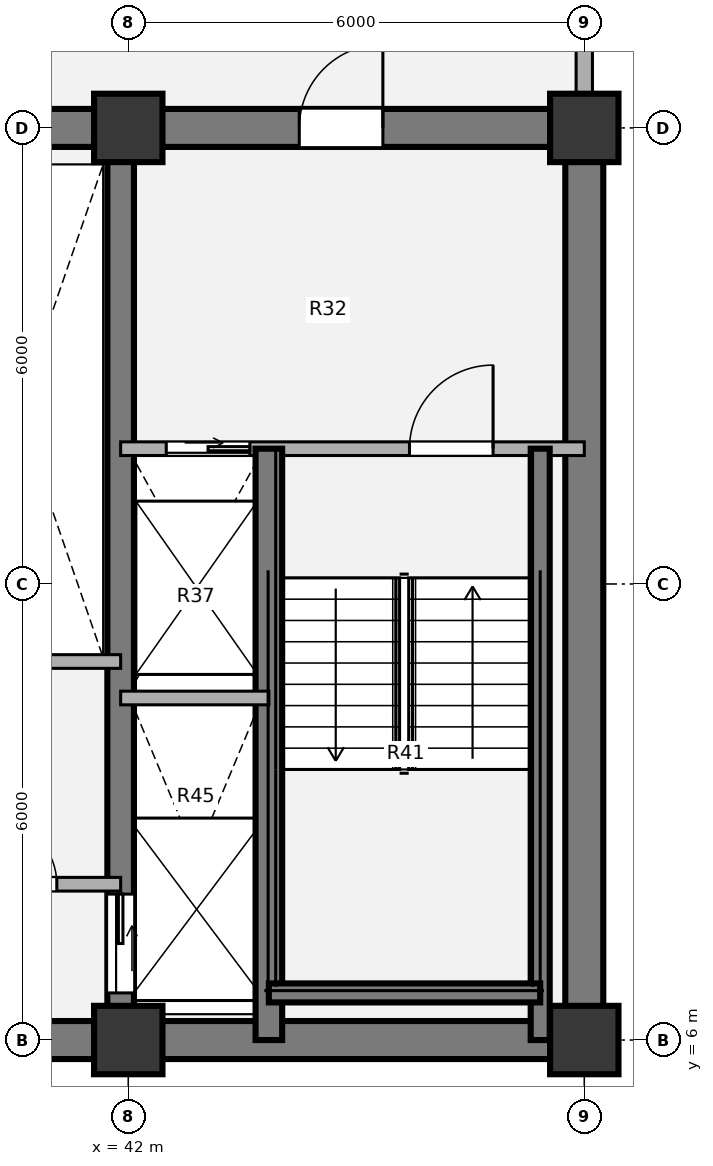
"""IFC4 building model, lengths in metres.
Left out: names, types, materials, properties, quantities, classifications, styles, units other than length and angle.
Written with IfcOpenShell. Run it as: python <this file> out.ifc"""

import sys

from ifc_helpers import new_model, si_unit, direction, frame, frame_2d, origin, origin_2d, place, context, subcontext, project, spatial, rectangle, extrude, source, transform, mapped, element, fill, save


model = new_model("IFC4")
c1 = context("Model", 3, precision=1e-05, world=origin(), true_north=direction((0.0, 1.0)))
c2 = subcontext(c1, "Body", "Model", "MODEL_VIEW")
j1 = project(units=[si_unit("LENGTHUNIT", "METRE"), si_unit("PLANEANGLEUNIT", "RADIAN")], contexts=[c1])
p1 = place(None, origin())
s1 = spatial("IfcSite", under=j1, at=p1, CompositionType="ELEMENT")
p2 = place(p1, origin())
s2 = spatial("IfcBuilding", under=s1, at=p2, CompositionType="ELEMENT")
p3 = place(p2, frame((0.0, 0.0, 135.18)))
s3 = spatial("IfcBuildingStorey", under=s2, at=p3, CompositionType="ELEMENT", Elevation=135.18)
m1 = source(origin(), c2, "Body", "SweptSolid", [
    extrude(rectangle(XDim=0.9, YDim=0.9, at=origin_2d()), origin(), (0.0, 0.0, 1.0), 3.78),
])
for number, where, z_axis, x_axis in (
    (1, (42.0, 6.0, 0.0), (0.0, 0.0, 1.0), (1.0, 0.0, 0.0)),
    (2, (48.0, 6.0, 0.0), (0.0, 0.0, 1.0), (1.0, 0.0, 0.0)),
    (3, (42.0, 18.0, 0.0), (0.0, 0.0, 1.0), (1.0, 0.0, 0.0)),
    (4, (48.0, 18.0, 0.0), (0.0, 0.0, 1.0), (1.0, 0.0, 0.0)),
):
    element("IfcColumn", number, at=place(p3, frame(where, z_axis=z_axis, x_axis=x_axis)), inside=s3, PredefinedType="COLUMN", context=c2, shape_type="MappedRepresentation", body=[
        mapped(m1, transform((0.0, 0.0, 0.0), x_axis=(1.0, 0.0, 0.0), y_axis=(0.0, 1.0, 0.0), z_axis=(0.0, 0.0, 1.0), scale=1.0)),
    ])
p4 = place(p3, frame((48.25, 6.0, 0.0), z_axis=(0.0, 0.0, 1.0), x_axis=(-1.0, 0.0, 0.0)))
e5 = element("IfcWall", 5, at=p4, inside=s3, PredefinedType="SHEAR", context=c2, shape_type="SweptSolid", body=[
    extrude(rectangle(XDim=24.5, YDim=0.5, at=frame_2d((12.25, 0.0))), origin(), (0.0, 0.0, 1.0), 3.78),
])
p5 = place(p3, frame((48.0, 18.0, 0.0), z_axis=(0.0, 0.0, 1.0), x_axis=(0.0, -1.0, 0.0)))
e6 = element("IfcWall", 6, at=p5, inside=s3, PredefinedType="SHEAR", context=c2, shape_type="SweptSolid", body=[
    extrude(rectangle(XDim=12.0, YDim=0.5, at=frame_2d((6.0, 0.0))), origin(), (0.0, 0.0, 1.0), 3.78),
])
p6 = place(p3, frame((38.8, 18.0, 0.0), z_axis=(0.0, 0.0, 1.0), x_axis=(1.0, 0.0, 0.0)))
e7 = element("IfcWall", 7, at=p6, inside=s3, PredefinedType="SHEAR", context=c2, shape_type="SweptSolid", body=[
    extrude(rectangle(XDim=9.45, YDim=0.5, at=frame_2d((4.725, 0.0))), origin(), (0.0, 0.0, 1.0), 3.78),
])
p7 = place(p6, frame((5.45, 0.0, 0.0)))
e8 = element("IfcOpeningElement", 8, at=p7, cuts=e7, PredefinedType="OPENING", context=c2, shape_type="SweptSolid", body=[
    extrude(rectangle(XDim=1.1, YDim=2.1, at=origin_2d()), frame((0.55, 0.26, 1.05), z_axis=(0.0, -1.0, 0.0), x_axis=(1.0, 0.0, 0.0)), (0.0, 0.0, 1.0), 0.52),
])
p8 = place(p3, frame((41.9, 18.0, 0.0), z_axis=(0.0, 0.0, 1.0), x_axis=(0.0, -1.0, 0.0)))
e9 = element("IfcWall", 9, at=p8, inside=s3, PredefinedType="SHEAR", context=c2, shape_type="SweptSolid", body=[
    extrude(rectangle(XDim=12.0, YDim=0.35, at=frame_2d((6.0, 0.0))), origin(), (0.0, 0.0, 1.0), 3.78),
])
p9 = place(p8, frame((10.08, 0.0, 0.0)))
e10 = element("IfcOpeningElement", 10, at=p9, cuts=e9, PredefinedType="OPENING", context=c2, shape_type="SweptSolid", body=[
    extrude(rectangle(XDim=1.3, YDim=2.1, at=origin_2d()), frame((0.65, 0.185, 1.05), z_axis=(0.0, -1.0, 0.0), x_axis=(1.0, 0.0, 0.0)), (0.0, 0.0, 1.0), 0.37),
])
p10 = place(p3, frame((48.0, 21.05, 0.0), z_axis=(0.0, 0.0, 1.0), x_axis=(0.0, -1.0, 0.0)))
e11 = element("IfcWall", 11, at=p10, inside=s3, PredefinedType="SOLIDWALL", context=c2, shape_type="SweptSolid", body=[
    extrude(rectangle(XDim=2.62, YDim=0.215, at=frame_2d((1.31, 0.0))), origin(), (0.0, 0.0, 1.0), 3.53),
])
p11 = place(p3, frame((39.35, 10.98, 0.0), z_axis=(0.0, 0.0, 1.0), x_axis=(1.0, 0.0, 0.0)))
e12 = element("IfcWall", 12, at=p11, inside=s3, PredefinedType="PARTITIONING", context=c2, shape_type="SweptSolid", body=[
    extrude(rectangle(XDim=2.55, YDim=0.18, at=frame_2d((1.275, 0.0))), origin(), (0.0, 0.0, 1.0), 3.5),
])
p12 = place(p3, frame((39.35, 8.05, 0.0), z_axis=(0.0, 0.0, 1.0), x_axis=(1.0, 0.0, 0.0)))
e13 = element("IfcWall", 13, at=p12, inside=s3, PredefinedType="PARTITIONING", context=c2, shape_type="SweptSolid", body=[
    extrude(rectangle(XDim=2.55, YDim=0.18, at=frame_2d((1.275, 0.0))), origin(), (0.0, 0.0, 1.0), 3.5),
])
p13 = place(p12, frame((0.85, 0.0, 0.0)))
e14 = element("IfcOpeningElement", 14, at=p13, cuts=e13, PredefinedType="OPENING", context=c2, shape_type="SweptSolid", body=[
    extrude(rectangle(XDim=0.86, YDim=2.1, at=origin_2d()), frame((0.43, 0.1, 1.05), z_axis=(0.0, -1.0, 0.0), x_axis=(1.0, 0.0, 0.0)), (0.0, 0.0, 1.0), 0.2),
])
p14 = place(p3, frame((41.9, 13.78, 0.0), z_axis=(0.0, 0.0, 1.0), x_axis=(1.0, 0.0, 0.0)))
e15 = element("IfcWall", 15, at=p14, inside=s3, PredefinedType="PARTITIONING", context=c2, shape_type="SweptSolid", body=[
    extrude(rectangle(XDim=6.1, YDim=0.18, at=frame_2d((3.05, 0.0))), origin(), (0.0, 0.0, 1.0), 3.5),
])
p15 = place(p14, frame((0.6, 0.0, 0.0)))
e16 = element("IfcOpeningElement", 16, at=p15, cuts=e15, PredefinedType="OPENING", context=c2, shape_type="SweptSolid", body=[
    extrude(rectangle(XDim=1.1, YDim=2.1, at=origin_2d()), frame((0.55, 0.1, 1.05), z_axis=(0.0, -1.0, 0.0), x_axis=(1.0, 0.0, 0.0)), (0.0, 0.0, 1.0), 0.2),
])
p16 = place(p14, frame((3.8, 0.0, 0.0)))
e17 = element("IfcOpeningElement", 17, at=p16, cuts=e15, PredefinedType="OPENING", context=c2, shape_type="SweptSolid", body=[
    extrude(rectangle(XDim=1.1, YDim=2.1, at=origin_2d()), frame((0.55, 0.1, 1.05), z_axis=(0.0, -1.0, 0.0), x_axis=(1.0, 0.0, 0.0)), (0.0, 0.0, 1.0), 0.2),
])
p17 = place(p3, frame((43.85, 6.0, 0.0), z_axis=(0.0, 0.0, 1.0), x_axis=(0.0, 1.0, 0.0)))
e18 = element("IfcWall", 18, at=p17, inside=s3, PredefinedType="SHEAR", context=c2, shape_type="SweptSolid", body=[
    extrude(rectangle(XDim=7.78, YDim=0.35, at=frame_2d((3.89, 0.0))), origin(), (0.0, 0.0, 1.0), 3.85),
])
p18 = place(p3, frame((47.42, 6.0, 0.0), z_axis=(0.0, 0.0, 1.0), x_axis=(0.0, 1.0, 0.0)))
e19 = element("IfcWall", 19, at=p18, inside=s3, PredefinedType="SHEAR", context=c2, shape_type="SweptSolid", body=[
    extrude(rectangle(XDim=7.78, YDim=0.25, at=frame_2d((3.89, 0.0))), origin(), (0.0, 0.0, 1.0), 3.85),
])
p19 = place(p3, frame((43.85, 6.62, 0.0), z_axis=(0.0, 0.0, 1.0), x_axis=(1.0, 0.0, 0.0)))
e20 = element("IfcWall", 20, at=p19, inside=s3, PredefinedType="SHEAR", context=c2, shape_type="SweptSolid", body=[
    extrude(rectangle(XDim=3.57, YDim=0.25, at=frame_2d((1.785, 0.0))), origin(), (0.0, 0.0, 1.0), 3.85),
])
p20 = place(p3, frame((41.9, 10.5, 0.0), z_axis=(0.0, 0.0, 1.0), x_axis=(1.0, 0.0, 0.0)))
e21 = element("IfcWall", 21, at=p20, inside=s3, PredefinedType="PARTITIONING", context=c2, shape_type="SweptSolid", body=[
    extrude(rectangle(XDim=1.95, YDim=0.18, at=frame_2d((0.975, 0.0))), origin(), (0.0, 0.0, 1.0), 3.5),
])
m2 = source(origin(), c2, "Body", "SweptSolid", [
    extrude(rectangle(XDim=0.86, YDim=2.1, at=origin_2d()), frame((0.43, 0.025, 1.05), z_axis=(0.0, -1.0, 0.0), x_axis=(1.0, 0.0, 0.0)), (0.0, 0.0, 1.0), 0.05),
])
p21 = place(p13, origin())
e22 = element("IfcDoor", 22, at=p21, inside=s3, OperationType="SINGLE_SWING_LEFT", PredefinedType="DOOR", context=c2, shape_type="MappedRepresentation", body=[
    mapped(m2, transform((0.0, 0.0, 0.0), x_axis=(1.0, 0.0, 0.0), y_axis=(0.0, 1.0, 0.0), z_axis=(0.0, 0.0, 1.0), scale=1.0)),
])
fill(e14, e22)
m3 = source(origin(), c2, "Body", "SweptSolid", [
    extrude(rectangle(XDim=1.1, YDim=2.1, at=origin_2d()), frame((0.55, 0.025, 1.05), z_axis=(0.0, -1.0, 0.0), x_axis=(1.0, 0.0, 0.0)), (0.0, 0.0, 1.0), 0.05),
])
p22 = place(p15, origin())
e23 = element("IfcDoor", 23, at=p22, inside=s3, OperationType="SLIDING_TO_RIGHT", PredefinedType="DOOR", context=c2, shape_type="MappedRepresentation", body=[
    mapped(m3, transform((0.0, 0.0, 0.0), x_axis=(1.0, 0.0, 0.0), y_axis=(0.0, 1.0, 0.0), z_axis=(0.0, 0.0, 1.0), scale=1.0)),
])
fill(e16, e23)
m4 = source(origin(), c2, "Body", "SweptSolid", [
    extrude(rectangle(XDim=1.1, YDim=2.1, at=origin_2d()), frame((0.55, 0.025, 1.05), z_axis=(0.0, -1.0, 0.0), x_axis=(1.0, 0.0, 0.0)), (0.0, 0.0, 1.0), 0.05),
])
p23 = place(p16, origin())
e24 = element("IfcDoor", 24, at=p23, inside=s3, OperationType="SINGLE_SWING_RIGHT", PredefinedType="DOOR", context=c2, shape_type="MappedRepresentation", body=[
    mapped(m4, transform((0.0, 0.0, 0.0), x_axis=(1.0, 0.0, 0.0), y_axis=(0.0, 1.0, 0.0), z_axis=(0.0, 0.0, 1.0), scale=1.0)),
])
fill(e17, e24)
m5 = source(origin(), c2, "Body", "SweptSolid", [
    extrude(rectangle(XDim=1.3, YDim=2.1, at=origin_2d()), frame((0.65, 0.025, 1.05), z_axis=(0.0, -1.0, 0.0), x_axis=(1.0, 0.0, 0.0)), (0.0, 0.0, 1.0), 0.05),
])
p24 = place(p9, origin())
e25 = element("IfcDoor", 25, at=p24, inside=s3, OperationType="SLIDING_TO_LEFT", PredefinedType="DOOR", context=c2, shape_type="MappedRepresentation", body=[
    mapped(m5, transform((0.0, 0.0, 0.0), x_axis=(1.0, 0.0, 0.0), y_axis=(0.0, 1.0, 0.0), z_axis=(0.0, 0.0, 1.0), scale=1.0)),
])
fill(e10, e25)
m6 = source(origin(), c2, "Body", "SweptSolid", [
    extrude(rectangle(XDim=1.1, YDim=2.1, at=origin_2d()), frame((0.55, 0.025, 1.05), z_axis=(0.0, -1.0, 0.0), x_axis=(1.0, 0.0, 0.0)), (0.0, 0.0, 1.0), 0.05),
])
p25 = place(p7, origin())
e26 = element("IfcDoor", 26, at=p25, inside=s3, OperationType="SINGLE_SWING_RIGHT", PredefinedType="DOOR", context=c2, shape_type="MappedRepresentation", body=[
    mapped(m6, transform((0.0, 0.0, 0.0), x_axis=(1.0, 0.0, 0.0), y_axis=(0.0, 1.0, 0.0), z_axis=(0.0, 0.0, 1.0), scale=1.0)),
])
fill(e8, e26)
save(model, sys.argv[1])
